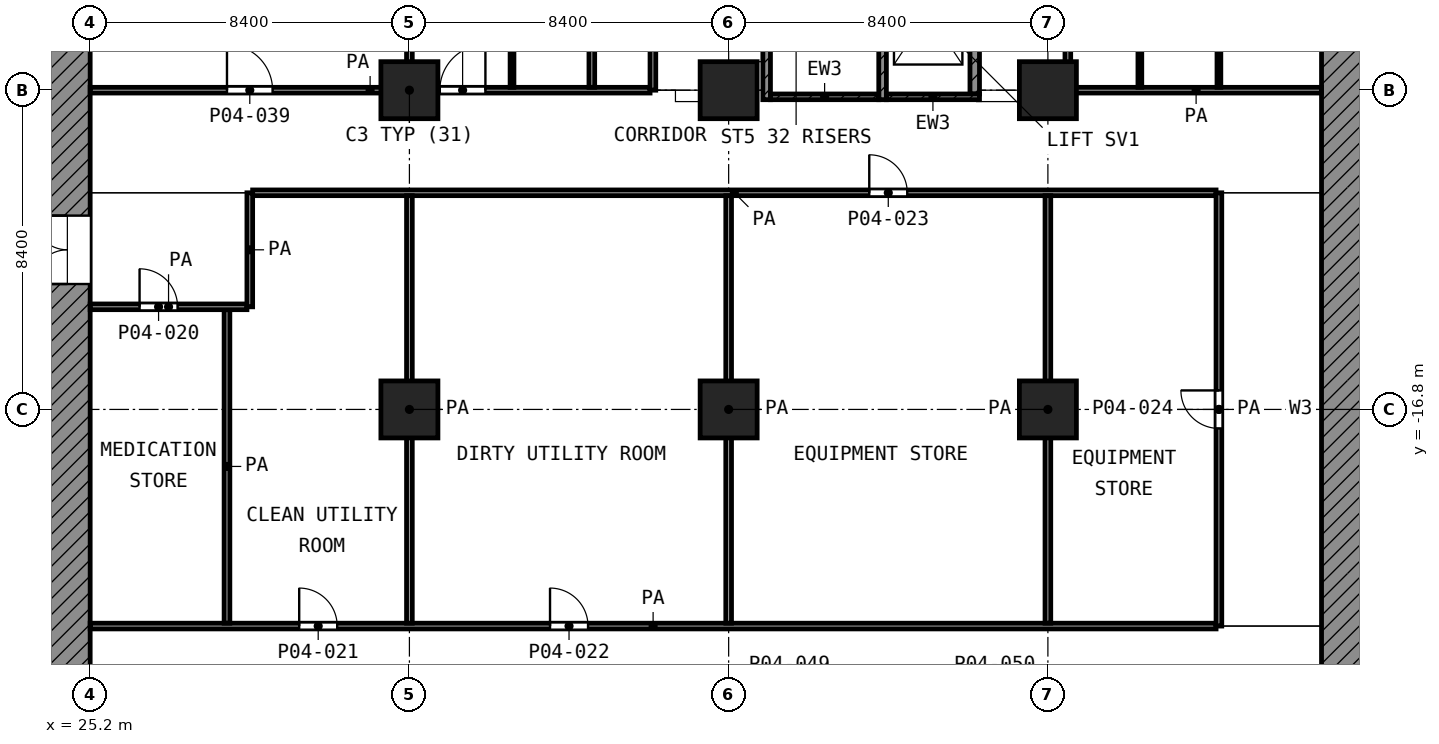
"""IFC4 building model, lengths in metres.
Left out: names, types, materials, properties, quantities, classifications, styles, units other than length and angle.
Written with IfcOpenShell. Run it as: python <this file> out.ifc"""

import sys

from ifc_helpers import new_model, si_unit, direction, frame, frame_2d, origin, origin_2d, place, context, subcontext, project, spatial, polyline, rectangle, outline, extrude, element, fill, save


model = new_model("IFC4")
c1 = context("Model", 3, precision=1e-05, world=origin(), true_north=direction((0.0, 1.0)))
c2 = subcontext(c1, "Body", "Model", "MODEL_VIEW")
j1 = project(units=[si_unit("LENGTHUNIT", "METRE"), si_unit("PLANEANGLEUNIT", "RADIAN")], contexts=[c1])
p1 = place(None, origin())
s1 = spatial("IfcSite", under=j1, at=p1, CompositionType="ELEMENT")
p2 = place(p1, origin())
s2 = spatial("IfcBuilding", under=s1, at=p2, CompositionType="ELEMENT")
p3 = place(p2, frame((0.0, 0.0, 18.2)))
s3 = spatial("IfcBuildingStorey", under=s2, at=p3, CompositionType="ELEMENT", Elevation=18.2)
for number, where, z_axis, x_axis in (
    (1, (33.6, -8.4, 0.0), (0.0, 0.0, 1.0), (1.0, 0.0, 0.0)),
    (2, (42.0, -8.4, 0.0), (0.0, 0.0, 1.0), (1.0, 0.0, 0.0)),
    (3, (50.4, -8.4, 0.0), (0.0, 0.0, 1.0), (1.0, 0.0, 0.0)),
    (4, (33.6, -16.8, 0.0), (0.0, 0.0, 1.0), (1.0, 0.0, 0.0)),
    (5, (42.0, -16.8, 0.0), (0.0, 0.0, 1.0), (1.0, 0.0, 0.0)),
    (6, (50.4, -16.8, 0.0), (0.0, 0.0, 1.0), (1.0, 0.0, 0.0)),
):
    element("IfcColumn", number, at=place(p3, frame(where, z_axis=z_axis, x_axis=x_axis)), inside=s3, PredefinedType="COLUMN", context=c2, shape_type="SweptSolid", body=[
        extrude(rectangle(XDim=1.5, YDim=1.5, at=origin_2d()), origin(), (0.0, 0.0, 1.0), 5.6),
    ])
p4 = place(p3, frame((0.0, 0.0, -18.2), z_axis=(0.0, -1.0, 0.0), x_axis=(1.0, 0.0, 0.0)))
e7 = element("IfcWall", 7, at=p4, inside=s3, PredefinedType="SHEAR", context=c2, shape_type="SweptSolid", body=[
    extrude(outline(polyline([(67.2, 23.25), (67.2, 22.4), (65.406, 21.022), (63.824, 19.406), (62.938, 18.2), (57.6, 18.2), (57.6, 23.25), (67.2, 23.25)])), origin(), (0.0, 0.0, 1.0), 33.6),
])
p5 = place(p3, frame((24.6, -24.0, 0.0), z_axis=(0.0, 0.0, 1.0), x_axis=(0.0, 1.0, 0.0)))
e8 = element("IfcWall", 8, at=p5, inside=s3, PredefinedType="SHEAR", context=c2, shape_type="SweptSolid", body=[
    extrude(rectangle(XDim=18.6, YDim=1.2, at=frame_2d((9.3, 0.0))), origin(), (0.0, 0.0, 1.0), 5.05),
])
p6 = place(p5, frame((10.5, 0.0, 0.0)))
e9 = element("IfcOpeningElement", 9, at=p6, cuts=e8, PredefinedType="OPENING", context=c2, shape_type="SweptSolid", body=[
    extrude(rectangle(XDim=1.8, YDim=2.1, at=frame_2d((0.9, 1.05))), frame((0.0, 0.61, 0.0), z_axis=(0.0, -1.0, 0.0), x_axis=(1.0, 0.0, 0.0)), (0.0, 0.0, 1.0), 1.22),
])
p7 = place(p3, frame((43.0, -8.65, 0.0), z_axis=(0.0, 0.0, 1.0), x_axis=(0.0, 1.0, 0.0)))
e10 = element("IfcWall", 10, at=p7, inside=s3, PredefinedType="SHEAR", context=c2, shape_type="SweptSolid", body=[
    extrude(rectangle(XDim=8.35, YDim=0.2, at=frame_2d((4.175, 0.0))), origin(), (0.0, 0.0, 1.0), 5.05),
])
p8 = place(p7, frame((7.0, 0.0, 0.0)))
e11 = element("IfcOpeningElement", 11, at=p8, cuts=e10, PredefinedType="OPENING", context=c2, shape_type="SweptSolid", body=[
    extrude(rectangle(XDim=1.1, YDim=2.1, at=frame_2d((0.55, 1.05))), frame((0.0, 0.11, 0.0), z_axis=(0.0, -1.0, 0.0), x_axis=(1.0, 0.0, 0.0)), (0.0, 0.0, 1.0), 0.22),
])
p9 = place(p3, frame((46.05, -8.65, 0.0), z_axis=(0.0, 0.0, 1.0), x_axis=(0.0, 1.0, 0.0)))
e12 = element("IfcWall", 12, at=p9, inside=s3, PredefinedType="SHEAR", context=c2, shape_type="SweptSolid", body=[
    extrude(rectangle(XDim=8.35, YDim=0.2, at=frame_2d((4.175, 0.0))), origin(), (0.0, 0.0, 1.0), 5.05),
])
p10 = place(p9, frame((7.0, 0.0, 0.0)))
e13 = element("IfcOpeningElement", 13, at=p10, cuts=e12, PredefinedType="OPENING", context=c2, shape_type="SweptSolid", body=[
    extrude(rectangle(XDim=1.1, YDim=2.1, at=frame_2d((0.55, 1.05))), frame((0.0, 0.11, 0.0), z_axis=(0.0, -1.0, 0.0), x_axis=(1.0, 0.0, 0.0)), (0.0, 0.0, 1.0), 0.22),
])
p11 = place(p3, frame((43.1, -8.575, 0.0), z_axis=(0.0, 0.0, 1.0), x_axis=(1.0, 0.0, 0.0)))
e14 = element("IfcWall", 14, at=p11, inside=s3, PredefinedType="SHEAR", context=c2, shape_type="SweptSolid", body=[
    extrude(rectangle(XDim=2.85, YDim=0.15, at=frame_2d((1.425, 0.0))), origin(), (0.0, 0.0, 1.0), 5.05),
])
p12 = place(p3, frame((46.15, -8.575, 0.0), z_axis=(0.0, 0.0, 1.0), x_axis=(1.0, 0.0, 0.0)))
e15 = element("IfcWall", 15, at=p12, inside=s3, PredefinedType="SHEAR", context=c2, shape_type="SweptSolid", body=[
    extrude(rectangle(XDim=2.45, YDim=0.15, at=frame_2d((1.225, 0.0))), origin(), (0.0, 0.0, 1.0), 5.05),
])
p13 = place(p3, frame((48.475, -8.5, 0.0), z_axis=(0.0, 0.0, 1.0), x_axis=(0.0, 1.0, 0.0)))
e16 = element("IfcWall", 16, at=p13, inside=s3, PredefinedType="SHEAR", context=c2, shape_type="SweptSolid", body=[
    extrude(rectangle(XDim=3.475, YDim=0.25, at=frame_2d((1.738, 0.0))), origin(), (0.0, 0.0, 1.0), 5.05),
])
p14 = place(p3, frame((36.3, -8.325, 0.0), z_axis=(0.0, 0.0, 1.0), x_axis=(0.0, 1.0, 0.0)))
e17 = element("IfcWall", 17, at=p14, inside=s3, PredefinedType="PARTITIONING", context=c2, shape_type="SweptSolid", body=[
    extrude(rectangle(XDim=2.625, YDim=0.1, at=frame_2d((1.312, 0.0))), origin(), (0.0, 0.0, 1.0), 5.05),
])
for number, where, z_axis, x_axis in (
    (18, (52.82, -8.325, 0.0), (0.0, 0.0, 1.0), (0.0, 1.0, 0.0)),
    (19, (54.9, -8.325, 0.0), (0.0, 0.0, 1.0), (0.0, 1.0, 0.0)),
):
    element("IfcWall", number, at=place(p3, frame(where, z_axis=z_axis, x_axis=x_axis)), inside=s3, PredefinedType="PARTITIONING", context=c2, shape_type="SweptSolid", body=[
        extrude(rectangle(XDim=2.623, YDim=0.1, at=frame_2d((1.312, 0.0))), origin(), (0.0, 0.0, 1.0), 5.05),
    ])
p15 = place(p3, frame((25.2, -22.5, 0.0), z_axis=(0.0, 0.0, 1.0), x_axis=(1.0, 0.0, 0.0)))
e20 = element("IfcWall", 20, at=p15, inside=s3, PredefinedType="PARTITIONING", context=c2, shape_type="SweptSolid", body=[
    extrude(rectangle(XDim=29.625, YDim=0.15, at=frame_2d((14.812, 0.0))), origin(), (0.0, 0.0, 1.0), 5.05),
])
p16 = place(p15, frame((5.5, 0.0, 0.0)))
e21 = element("IfcOpeningElement", 21, at=p16, cuts=e20, PredefinedType="OPENING", context=c2, shape_type="SweptSolid", body=[
    extrude(rectangle(XDim=1.0, YDim=2.1, at=frame_2d((0.5, 1.05))), frame((0.0, 0.085, 0.0), z_axis=(0.0, -1.0, 0.0), x_axis=(1.0, 0.0, 0.0)), (0.0, 0.0, 1.0), 0.17),
])
p17 = place(p15, frame((12.1, 0.0, 0.0)))
e22 = element("IfcOpeningElement", 22, at=p17, cuts=e20, PredefinedType="OPENING", context=c2, shape_type="SweptSolid", body=[
    extrude(rectangle(XDim=1.0, YDim=2.1, at=frame_2d((0.5, 1.05))), frame((0.0, 0.085, 0.0), z_axis=(0.0, -1.0, 0.0), x_axis=(1.0, 0.0, 0.0)), (0.0, 0.0, 1.0), 0.17),
])
p18 = place(p3, frame((25.2, -14.1, 0.0), z_axis=(0.0, 0.0, 1.0), x_axis=(1.0, 0.0, 0.0)))
e23 = element("IfcWall", 23, at=p18, inside=s3, PredefinedType="PARTITIONING", context=c2, shape_type="SweptSolid", body=[
    extrude(rectangle(XDim=4.125, YDim=0.15, at=frame_2d((2.062, 0.0))), origin(), (0.0, 0.0, 1.0), 5.05),
])
p19 = place(p18, frame((1.3, 0.0, 0.0)))
e24 = element("IfcOpeningElement", 24, at=p19, cuts=e23, PredefinedType="OPENING", context=c2, shape_type="SweptSolid", body=[
    extrude(rectangle(XDim=1.0, YDim=2.1, at=frame_2d((0.5, 1.05))), frame((0.0, 0.085, 0.0), z_axis=(0.0, -1.0, 0.0), x_axis=(1.0, 0.0, 0.0)), (0.0, 0.0, 1.0), 0.17),
])
p20 = place(p3, frame((29.475, -11.1, 0.0), z_axis=(0.0, 0.0, 1.0), x_axis=(1.0, 0.0, 0.0)))
e25 = element("IfcWall", 25, at=p20, inside=s3, PredefinedType="PARTITIONING", context=c2, shape_type="SweptSolid", body=[
    extrude(rectangle(XDim=25.35, YDim=0.15, at=frame_2d((12.675, 0.0))), origin(), (0.0, 0.0, 1.0), 5.05),
])
p21 = place(p20, frame((16.225, 0.0, 0.0)))
e26 = element("IfcOpeningElement", 26, at=p21, cuts=e25, PredefinedType="OPENING", context=c2, shape_type="SweptSolid", body=[
    extrude(rectangle(XDim=1.0, YDim=2.1, at=frame_2d((0.5, 1.05))), frame((0.0, 0.085, 0.0), z_axis=(0.0, -1.0, 0.0), x_axis=(1.0, 0.0, 0.0)), (0.0, 0.0, 1.0), 0.17),
])
p22 = place(p3, frame((25.2, -8.4, 0.0), z_axis=(0.0, 0.0, 1.0), x_axis=(1.0, 0.0, 0.0)))
e27 = element("IfcWall", 27, at=p22, inside=s3, PredefinedType="PARTITIONING", context=c2, shape_type="SweptSolid", body=[
    extrude(rectangle(XDim=14.732, YDim=0.15, at=frame_2d((7.366, 0.0))), origin(), (0.0, 0.0, 1.0), 5.05),
])
p23 = place(p22, frame((3.6, 0.0, 0.0)))
e28 = element("IfcOpeningElement", 28, at=p23, cuts=e27, PredefinedType="OPENING", context=c2, shape_type="SweptSolid", body=[
    extrude(rectangle(XDim=1.2, YDim=2.1, at=frame_2d((0.6, 1.05))), frame((0.0, 0.085, 0.0), z_axis=(0.0, -1.0, 0.0), x_axis=(1.0, 0.0, 0.0)), (0.0, 0.0, 1.0), 0.17),
])
p24 = place(p22, frame((9.2, 0.0, 0.0)))
e29 = element("IfcOpeningElement", 29, at=p24, cuts=e27, PredefinedType="OPENING", context=c2, shape_type="SweptSolid", body=[
    extrude(rectangle(XDim=1.2, YDim=2.1, at=frame_2d((0.6, 1.05))), frame((0.0, 0.085, 0.0), z_axis=(0.0, -1.0, 0.0), x_axis=(1.0, 0.0, 0.0)), (0.0, 0.0, 1.0), 0.17),
])
p25 = place(p3, frame((51.0, -8.4, 0.0), z_axis=(0.0, 0.0, 1.0), x_axis=(1.0, 0.0, 0.0)))
e30 = element("IfcWall", 30, at=p25, inside=s3, PredefinedType="PARTITIONING", context=c2, shape_type="SweptSolid", body=[
    extrude(rectangle(XDim=6.6, YDim=0.15, at=frame_2d((3.3, 0.0))), origin(), (0.0, 0.0, 1.0), 5.05),
])
p26 = place(p3, frame((28.8, -22.425, 0.0), z_axis=(0.0, 0.0, 1.0), x_axis=(0.0, 1.0, 0.0)))
e31 = element("IfcWall", 31, at=p26, inside=s3, PredefinedType="PARTITIONING", context=c2, shape_type="SweptSolid", body=[
    extrude(rectangle(XDim=8.25, YDim=0.15, at=frame_2d((4.125, 0.0))), origin(), (0.0, 0.0, 1.0), 5.05),
])
p27 = place(p3, frame((29.4, -14.1, 0.0), z_axis=(0.0, 0.0, 1.0), x_axis=(0.0, 1.0, 0.0)))
e32 = element("IfcWall", 32, at=p27, inside=s3, PredefinedType="PARTITIONING", context=c2, shape_type="SweptSolid", body=[
    extrude(rectangle(XDim=3.0, YDim=0.15, at=frame_2d((1.5, 0.0))), origin(), (0.0, 0.0, 1.0), 5.05),
])
p28 = place(p3, frame((33.6, -22.425, 0.0), z_axis=(0.0, 0.0, 1.0), x_axis=(0.0, 1.0, 0.0)))
e33 = element("IfcWall", 33, at=p28, inside=s3, PredefinedType="PARTITIONING", context=c2, shape_type="SweptSolid", body=[
    extrude(rectangle(XDim=11.25, YDim=0.15, at=frame_2d((5.625, 0.0))), origin(), (0.0, 0.0, 1.0), 5.05),
])
p29 = place(p3, frame((33.6, -8.325, 0.0), z_axis=(0.0, 0.0, 1.0), x_axis=(0.0, 1.0, 0.0)))
e34 = element("IfcWall", 34, at=p29, inside=s3, PredefinedType="PARTITIONING", context=c2, shape_type="SweptSolid", body=[
    extrude(rectangle(XDim=8.323, YDim=0.15, at=frame_2d((4.162, 0.0))), origin(), (0.0, 0.0, 1.0), 5.05),
])
p30 = place(p3, frame((38.4, -8.325, 0.0), z_axis=(0.0, 0.0, 1.0), x_axis=(0.0, 1.0, 0.0)))
e35 = element("IfcWall", 35, at=p30, inside=s3, PredefinedType="PARTITIONING", context=c2, shape_type="SweptSolid", body=[
    extrude(rectangle(XDim=8.323, YDim=0.15, at=frame_2d((4.162, 0.0))), origin(), (0.0, 0.0, 1.0), 3.65),
])
p31 = place(p3, frame((40.007, -8.4, 0.0), z_axis=(0.0, 0.0, 1.0), x_axis=(0.0, 1.0, 0.0)))
e36 = element("IfcWall", 36, at=p31, inside=s3, PredefinedType="PARTITIONING", context=c2, shape_type="SweptSolid", body=[
    extrude(rectangle(XDim=8.05, YDim=0.15, at=frame_2d((4.025, 0.0))), origin(), (0.0, 0.0, 1.0), 3.65),
])
p32 = place(p31, frame((3.525, 0.0, 0.0)))
e37 = element("IfcOpeningElement", 37, at=p32, cuts=e36, PredefinedType="OPENING", context=c2, shape_type="SweptSolid", body=[
    extrude(rectangle(XDim=1.0, YDim=2.1, at=frame_2d((0.5, 1.05))), frame((0.0, 0.085, 0.0), z_axis=(0.0, -1.0, 0.0), x_axis=(1.0, 0.0, 0.0)), (0.0, 0.0, 1.0), 0.17),
])
for number, where, z_axis, x_axis in (
    (38, (42.0, -22.425, 0.0), (0.0, 0.0, 1.0), (0.0, 1.0, 0.0)),
    (39, (50.4, -22.425, 0.0), (0.0, 0.0, 1.0), (0.0, 1.0, 0.0)),
):
    element("IfcWall", number, at=place(p3, frame(where, z_axis=z_axis, x_axis=x_axis)), inside=s3, PredefinedType="PARTITIONING", context=c2, shape_type="SweptSolid", body=[
        extrude(rectangle(XDim=11.25, YDim=0.15, at=frame_2d((5.625, 0.0))), origin(), (0.0, 0.0, 1.0), 5.05),
    ])
p33 = place(p3, frame((50.925, -8.4, 0.0), z_axis=(0.0, 0.0, 1.0), x_axis=(0.0, 1.0, 0.0)))
e40 = element("IfcWall", 40, at=p33, inside=s3, PredefinedType="PARTITIONING", context=c2, shape_type="SweptSolid", body=[
    extrude(rectangle(XDim=6.548, YDim=0.15, at=frame_2d((3.274, 0.0))), origin(), (0.0, 0.0, 1.0), 5.05),
])
p34 = place(p33, frame((3.765, 0.0, 0.0)))
e41 = element("IfcOpeningElement", 41, at=p34, cuts=e40, PredefinedType="OPENING", context=c2, shape_type="SweptSolid", body=[
    extrude(rectangle(XDim=1.2, YDim=2.1, at=frame_2d((0.6, 1.05))), frame((0.0, 0.085, 0.0), z_axis=(0.0, -1.0, 0.0), x_axis=(1.0, 0.0, 0.0)), (0.0, 0.0, 1.0), 0.17),
])
p35 = place(p33, frame((1.583, 0.0, 0.0)))
e42 = element("IfcOpeningElement", 42, at=p35, cuts=e40, PredefinedType="OPENING", context=c2, shape_type="SweptSolid", body=[
    extrude(rectangle(XDim=1.2, YDim=2.1, at=frame_2d((0.6, 1.05))), frame((0.0, 0.085, 0.0), z_axis=(0.0, -1.0, 0.0), x_axis=(1.0, 0.0, 0.0)), (0.0, 0.0, 1.0), 0.17),
])
p36 = place(p3, frame((54.9, -22.5, 0.0), z_axis=(0.0, 0.0, 1.0), x_axis=(0.0, 1.0, 0.0)))
e43 = element("IfcWall", 43, at=p36, inside=s3, PredefinedType="PARTITIONING", context=c2, shape_type="SweptSolid", body=[
    extrude(rectangle(XDim=11.4, YDim=0.15, at=frame_2d((5.7, 0.0))), origin(), (0.0, 0.0, 1.0), 5.05),
])
p37 = place(p36, frame((5.2, 0.0, 0.0)))
e44 = element("IfcOpeningElement", 44, at=p37, cuts=e43, PredefinedType="OPENING", context=c2, shape_type="SweptSolid", body=[
    extrude(rectangle(XDim=1.0, YDim=2.1, at=frame_2d((0.5, 1.05))), frame((0.0, 0.085, 0.0), z_axis=(0.0, -1.0, 0.0), x_axis=(1.0, 0.0, 0.0)), (0.0, 0.0, 1.0), 0.17),
])
p38 = place(p6, origin())
e45 = element("IfcDoor", 45, at=p38, inside=s3, OperationType="DOUBLE_DOOR_SINGLE_SWING", PredefinedType="DOOR", context=c2, shape_type="SweptSolid", body=[
    extrude(rectangle(XDim=1.8, YDim=2.1, at=frame_2d((0.9, 1.05))), frame((0.0, 0.025, 0.0), z_axis=(0.0, -1.0, 0.0), x_axis=(1.0, 0.0, 0.0)), (0.0, 0.0, 1.0), 0.05),
])
fill(e9, e45)
p39 = place(p23, origin())
e46 = element("IfcDoor", 46, at=p39, inside=s3, OperationType="SINGLE_SWING_LEFT", PredefinedType="DOOR", context=c2, shape_type="SweptSolid", body=[
    extrude(rectangle(XDim=1.2, YDim=2.1, at=frame_2d((0.6, 1.05))), frame((0.0, 0.025, 0.0), z_axis=(0.0, -1.0, 0.0), x_axis=(1.0, 0.0, 0.0)), (0.0, 0.0, 1.0), 0.05),
])
fill(e28, e46)
p40 = place(p24, origin())
e47 = element("IfcDoor", 47, at=p40, inside=s3, OperationType="SINGLE_SWING_RIGHT", PredefinedType="DOOR", context=c2, shape_type="SweptSolid", body=[
    extrude(rectangle(XDim=1.2, YDim=2.1, at=frame_2d((0.6, 1.05))), frame((0.0, 0.025, 0.0), z_axis=(0.0, -1.0, 0.0), x_axis=(1.0, 0.0, 0.0)), (0.0, 0.0, 1.0), 0.05),
])
fill(e29, e47)
p41 = place(p19, origin())
e48 = element("IfcDoor", 48, at=p41, inside=s3, OperationType="SINGLE_SWING_LEFT", PredefinedType="DOOR", context=c2, shape_type="SweptSolid", body=[
    extrude(rectangle(XDim=1.0, YDim=2.1, at=frame_2d((0.5, 1.05))), frame((0.0, 0.025, 0.0), z_axis=(0.0, -1.0, 0.0), x_axis=(1.0, 0.0, 0.0)), (0.0, 0.0, 1.0), 0.05),
])
fill(e24, e48)
p42 = place(p16, origin())
e49 = element("IfcDoor", 49, at=p42, inside=s3, OperationType="SINGLE_SWING_LEFT", PredefinedType="DOOR", context=c2, shape_type="SweptSolid", body=[
    extrude(rectangle(XDim=1.0, YDim=2.1, at=frame_2d((0.5, 1.05))), frame((0.0, 0.025, 0.0), z_axis=(0.0, -1.0, 0.0), x_axis=(1.0, 0.0, 0.0)), (0.0, 0.0, 1.0), 0.05),
])
fill(e21, e49)
p43 = place(p17, origin())
e50 = element("IfcDoor", 50, at=p43, inside=s3, OperationType="SINGLE_SWING_LEFT", PredefinedType="DOOR", context=c2, shape_type="SweptSolid", body=[
    extrude(rectangle(XDim=1.0, YDim=2.1, at=frame_2d((0.5, 1.05))), frame((0.0, 0.025, 0.0), z_axis=(0.0, -1.0, 0.0), x_axis=(1.0, 0.0, 0.0)), (0.0, 0.0, 1.0), 0.05),
])
fill(e22, e50)
p44 = place(p21, origin())
e51 = element("IfcDoor", 51, at=p44, inside=s3, OperationType="SINGLE_SWING_LEFT", PredefinedType="DOOR", context=c2, shape_type="SweptSolid", body=[
    extrude(rectangle(XDim=1.0, YDim=2.1, at=frame_2d((0.5, 1.05))), frame((0.0, 0.025, 0.0), z_axis=(0.0, -1.0, 0.0), x_axis=(1.0, 0.0, 0.0)), (0.0, 0.0, 1.0), 0.05),
])
fill(e26, e51)
p45 = place(p37, origin())
e52 = element("IfcDoor", 52, at=p45, inside=s3, OperationType="SINGLE_SWING_RIGHT", PredefinedType="DOOR", context=c2, shape_type="SweptSolid", body=[
    extrude(rectangle(XDim=1.0, YDim=2.1, at=frame_2d((0.5, 1.05))), frame((0.0, 0.025, 0.0), z_axis=(0.0, -1.0, 0.0), x_axis=(1.0, 0.0, 0.0)), (0.0, 0.0, 1.0), 0.05),
])
fill(e44, e52)
save(model, sys.argv[1])
